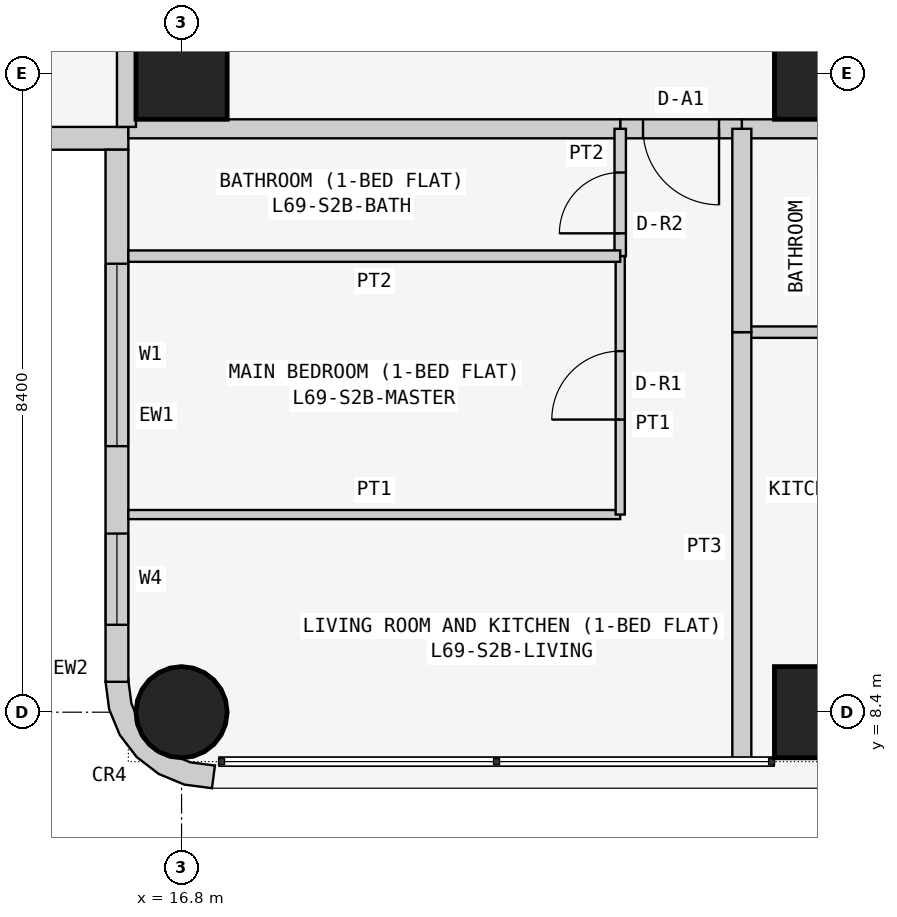
"""IFC4 building model, lengths in metres.
Left out: names, types, materials, properties, quantities, classifications, styles, units other than length and angle.
Written with IfcOpenShell. Run it as: python <this file> out.ifc"""

import sys

from ifc_helpers import new_model, si_unit, direction, frame, frame_2d, origin, origin_2d, place, context, subcontext, project, spatial, polyline, rectangle, circle, outline, extrude, element, fill, save


model = new_model("IFC4")
c1 = context("Model", 3, precision=1e-05, world=origin(), true_north=direction((0.0, 1.0)))
c2 = subcontext(c1, "Body", "Model", "MODEL_VIEW")
j1 = project(units=[si_unit("LENGTHUNIT", "METRE"), si_unit("PLANEANGLEUNIT", "RADIAN")], contexts=[c1])
p1 = place(None, origin())
s1 = spatial("IfcSite", under=j1, at=p1, CompositionType="ELEMENT")
p2 = place(p1, origin())
s2 = spatial("IfcBuilding", under=s1, at=p2, CompositionType="ELEMENT")
p3 = place(p2, frame((0.0, 0.0, 264.9)))
s3 = spatial("IfcBuildingStorey", under=s2, at=p3, CompositionType="ELEMENT", Elevation=264.9)
p4 = place(p3, frame((16.8, 8.4, 0.0), z_axis=(0.0, 0.0, 1.0), x_axis=(1.0, 0.0, 0.0)))
e1 = element("IfcColumn", 1, at=p4, inside=s3, PredefinedType="COLUMN", context=c2, shape_type="SweptSolid", body=[
    extrude(circle(Radius=0.6, at=origin_2d()), origin(), (0.0, 0.0, 1.0), 3.6),
])
for number, where, z_axis, x_axis in (
    (2, (16.8, 16.8, 0.0), (0.0, 0.0, 1.0), (1.0, 0.0, 0.0)),
    (3, (25.2, 8.4, 0.0), (0.0, 0.0, 1.0), (1.0, 0.0, 0.0)),
    (4, (25.2, 16.8, 0.0), (0.0, 0.0, 1.0), (1.0, 0.0, 0.0)),
):
    element("IfcColumn", number, at=place(p3, frame(where, z_axis=z_axis, x_axis=x_axis)), inside=s3, PredefinedType="COLUMN", context=c2, shape_type="SweptSolid", body=[
        extrude(rectangle(XDim=1.2, YDim=1.2, at=origin_2d()), origin(), (0.0, 0.0, 1.0), 3.6),
    ])
p5 = place(p3, frame((8.8, 15.95, 0.0), z_axis=(0.0, 0.0, 1.0), x_axis=(1.0, 0.0, 0.0)))
e5 = element("IfcWall", 5, at=p5, inside=s3, PredefinedType="SOLIDWALL", context=c2, shape_type="SweptSolid", body=[
    extrude(rectangle(XDim=7.3, YDim=0.3, at=frame_2d((3.65, 0.0))), origin(), (0.0, 0.0, 1.0), 3.45),
])
p6 = place(p5, frame((3.1, 0.0, 0.9)))
e6 = element("IfcOpeningElement", 6, at=p6, cuts=e5, PredefinedType="OPENING", context=c2, shape_type="SweptSolid", body=[
    extrude(rectangle(XDim=2.4, YDim=1.5, at=frame_2d((1.2, 0.75))), frame((0.0, 0.16, 0.0), z_axis=(0.0, -1.0, 0.0), x_axis=(1.0, 0.0, 0.0)), (0.0, 0.0, 1.0), 0.32),
])
p7 = place(p5, frame((0.75, 0.0, 0.9)))
e7 = element("IfcOpeningElement", 7, at=p7, cuts=e5, PredefinedType="OPENING", context=c2, shape_type="SweptSolid", body=[
    extrude(rectangle(XDim=1.2, YDim=1.5, at=frame_2d((0.6, 0.75))), frame((0.0, 0.16, 0.0), z_axis=(0.0, -1.0, 0.0), x_axis=(1.0, 0.0, 0.0)), (0.0, 0.0, 1.0), 0.32),
])
p8 = place(p3, frame((15.95, 15.8, 0.0), z_axis=(0.0, 0.0, 1.0), x_axis=(0.0, -1.0, 0.0)))
e8 = element("IfcWall", 8, at=p8, inside=s3, PredefinedType="SOLIDWALL", context=c2, shape_type="SweptSolid", body=[
    extrude(rectangle(XDim=7.0, YDim=0.3, at=frame_2d((3.5, 0.0))), origin(), (0.0, 0.0, 1.0), 3.45),
])
p9 = place(p8, frame((1.5, 0.0, 0.9)))
e9 = element("IfcOpeningElement", 9, at=p9, cuts=e8, PredefinedType="OPENING", context=c2, shape_type="SweptSolid", body=[
    extrude(rectangle(XDim=2.4, YDim=1.5, at=frame_2d((1.2, 0.75))), frame((0.0, 0.16, 0.0), z_axis=(0.0, -1.0, 0.0), x_axis=(1.0, 0.0, 0.0)), (0.0, 0.0, 1.0), 0.32),
])
p10 = place(p8, frame((5.05, 0.0, 0.9)))
e10 = element("IfcOpeningElement", 10, at=p10, cuts=e8, PredefinedType="OPENING", context=c2, shape_type="SweptSolid", body=[
    extrude(rectangle(XDim=1.2, YDim=1.5, at=frame_2d((0.6, 0.75))), frame((0.0, 0.16, 0.0), z_axis=(0.0, -1.0, 0.0), x_axis=(1.0, 0.0, 0.0)), (0.0, 0.0, 1.0), 0.32),
])
p11 = place(p3, frame((16.224, 8.762, 0.0), z_axis=(0.0, 0.0, 1.0), x_axis=(-0.707106781187, -0.707106781187, 0.0)))
e11 = element("IfcWall", 11, at=p11, inside=s3, PredefinedType="SOLIDWALL", context=c2, shape_type="SweptSolid", body=[
    extrude(outline(polyline([(0.033, 1.469), (0.047, 1.455), (0.233, 1.212), (0.292, 1.069), (0.358, 1.003), (0.449, 0.783), (0.449, 0.543), (0.358, 0.322), (0.292, 0.257), (0.233, 0.114), (0.047, -0.129), (0.033, -0.143), (0.273, -0.327), (0.495, -0.037), (0.635, 0.3), (0.683, 0.663), (0.635, 1.025), (0.495, 1.363), (0.273, 1.653), (0.033, 1.469)])), origin(), (0.0, 0.0, 1.0), 3.45),
])
p12 = place(p3, frame((26.8, 16.075, 0.0), z_axis=(0.0, 0.0, 1.0), x_axis=(-1.0, 0.0, 0.0)))
e12 = element("IfcWall", 12, at=p12, inside=s3, PredefinedType="PARTITIONING", context=c2, shape_type="SweptSolid", body=[
    extrude(rectangle(XDim=2.629, YDim=0.25, at=frame_2d((1.314, 0.0))), origin(), (0.0, 0.0, 1.0), 3.45),
])
p13 = place(p3, frame((24.171, 16.075, 0.0), z_axis=(0.0, 0.0, 1.0), x_axis=(-1.0, 0.0, 0.0)))
e13 = element("IfcWall", 13, at=p13, inside=s3, PredefinedType="PARTITIONING", context=c2, shape_type="SweptSolid", body=[
    extrude(rectangle(XDim=1.6, YDim=0.25, at=frame_2d((0.8, 0.0))), origin(), (0.0, 0.0, 1.0), 3.45),
])
p14 = place(p13, frame((0.3, 0.0, 0.0)))
e14 = element("IfcOpeningElement", 14, at=p14, cuts=e13, PredefinedType="OPENING", context=c2, shape_type="SweptSolid", body=[
    extrude(rectangle(XDim=1.0, YDim=2.1, at=frame_2d((0.5, 1.05))), frame((0.0, 0.135, 0.0), z_axis=(0.0, -1.0, 0.0), x_axis=(1.0, 0.0, 0.0)), (0.0, 0.0, 1.0), 0.27),
])
p15 = place(p3, frame((22.571, 16.075, 0.0), z_axis=(0.0, 0.0, 1.0), x_axis=(-1.0, 0.0, 0.0)))
e15 = element("IfcWall", 15, at=p15, inside=s3, PredefinedType="PARTITIONING", context=c2, shape_type="SweptSolid", body=[
    extrude(rectangle(XDim=6.471, YDim=0.25, at=frame_2d((3.235, 0.0))), origin(), (0.0, 0.0, 1.0), 3.45),
])
p16 = place(p3, frame((16.075, 16.1, 0.0), z_axis=(0.0, 0.0, 1.0), x_axis=(0.0, 1.0, 0.0)))
e16 = element("IfcWall", 16, at=p16, inside=s3, PredefinedType="PARTITIONING", context=c2, shape_type="SweptSolid", body=[
    extrude(rectangle(XDim=6.871, YDim=0.25, at=frame_2d((3.436, 0.0))), origin(), (0.0, 0.0, 1.0), 3.45),
])
p17 = place(p3, frame((24.171, 13.4, 0.0), z_axis=(0.0, 0.0, 1.0), x_axis=(1.0, 0.0, 0.0)))
e17 = element("IfcWall", 17, at=p17, inside=s3, PredefinedType="PARTITIONING", context=c2, shape_type="SweptSolid", body=[
    extrude(rectangle(XDim=2.629, YDim=0.15, at=frame_2d((1.314, 0.0))), origin(), (0.0, 0.0, 1.0), 3.45),
])
p18 = place(p3, frame((24.171, 7.75, 0.0), z_axis=(0.0, 0.0, 1.0), x_axis=(0.0, 1.0, 0.0)))
e18 = element("IfcWall", 18, at=p18, inside=s3, PredefinedType="PARTITIONING", context=c2, shape_type="SweptSolid", body=[
    extrude(rectangle(XDim=5.65, YDim=0.25, at=frame_2d((2.825, 0.0))), origin(), (0.0, 0.0, 1.0), 3.45),
])
p19 = place(p3, frame((24.171, 13.4, 0.0), z_axis=(0.0, 0.0, 1.0), x_axis=(0.0, 1.0, 0.0)))
e19 = element("IfcWall", 19, at=p19, inside=s3, PredefinedType="PARTITIONING", context=c2, shape_type="SweptSolid", body=[
    extrude(rectangle(XDim=2.675, YDim=0.25, at=frame_2d((1.337, 0.0))), origin(), (0.0, 0.0, 1.0), 3.45),
])
p20 = place(p3, frame((22.571, 14.4, 0.0), z_axis=(0.0, 0.0, 1.0), x_axis=(0.0, 1.0, 0.0)))
e20 = element("IfcWall", 20, at=p20, inside=s3, PredefinedType="PARTITIONING", context=c2, shape_type="SweptSolid", body=[
    extrude(rectangle(XDim=1.675, YDim=0.15, at=frame_2d((0.837, 0.0))), origin(), (0.0, 0.0, 1.0), 3.45),
])
p21 = place(p20, frame((0.3, 0.0, 0.0)))
e21 = element("IfcOpeningElement", 21, at=p21, cuts=e20, PredefinedType="OPENING", context=c2, shape_type="SweptSolid", body=[
    extrude(rectangle(XDim=0.8, YDim=2.1, at=frame_2d((0.4, 1.05))), frame((0.0, 0.085, 0.0), z_axis=(0.0, -1.0, 0.0), x_axis=(1.0, 0.0, 0.0)), (0.0, 0.0, 1.0), 0.17),
])
p22 = place(p3, frame((16.1, 11.0, 0.0), z_axis=(0.0, 0.0, 1.0), x_axis=(1.0, 0.0, 0.0)))
e22 = element("IfcWall", 22, at=p22, inside=s3, PredefinedType="PARTITIONING", context=c2, shape_type="SweptSolid", body=[
    extrude(rectangle(XDim=6.471, YDim=0.12, at=frame_2d((3.235, 0.0))), origin(), (0.0, 0.0, 1.0), 3.45),
])
p23 = place(p3, frame((22.571, 11.0, 0.0), z_axis=(0.0, 0.0, 1.0), x_axis=(0.0, 1.0, 0.0)))
e23 = element("IfcWall", 23, at=p23, inside=s3, PredefinedType="PARTITIONING", context=c2, shape_type="SweptSolid", body=[
    extrude(rectangle(XDim=3.4, YDim=0.12, at=frame_2d((1.7, 0.0))), origin(), (0.0, 0.0, 1.0), 3.45),
])
p24 = place(p23, frame((1.25, 0.0, 0.0)))
e24 = element("IfcOpeningElement", 24, at=p24, cuts=e23, PredefinedType="OPENING", context=c2, shape_type="SweptSolid", body=[
    extrude(rectangle(XDim=0.9, YDim=2.1, at=frame_2d((0.45, 1.05))), frame((0.0, 0.07, 0.0), z_axis=(0.0, -1.0, 0.0), x_axis=(1.0, 0.0, 0.0)), (0.0, 0.0, 1.0), 0.14),
])
p25 = place(p3, frame((22.571, 14.4, 0.0), z_axis=(0.0, 0.0, 1.0), x_axis=(-1.0, 0.0, 0.0)))
e25 = element("IfcWall", 25, at=p25, inside=s3, PredefinedType="PARTITIONING", context=c2, shape_type="SweptSolid", body=[
    extrude(rectangle(XDim=6.471, YDim=0.15, at=frame_2d((3.235, 0.0))), origin(), (0.0, 0.0, 1.0), 3.45),
])
p26 = place(p9, origin())
e26 = element("IfcWindow", 26, at=p26, inside=s3, PartitioningType="SINGLE_PANEL", PredefinedType="WINDOW", context=c2, shape_type="SweptSolid", body=[
    extrude(rectangle(XDim=2.4, YDim=1.5, at=frame_2d((1.2, 0.75))), frame((0.0, 0.03, 0.0), z_axis=(0.0, -1.0, 0.0), x_axis=(1.0, 0.0, 0.0)), (0.0, 0.0, 1.0), 0.06),
])
fill(e9, e26)
p27 = place(p10, origin())
e27 = element("IfcWindow", 27, at=p27, inside=s3, PartitioningType="SINGLE_PANEL", PredefinedType="WINDOW", context=c2, shape_type="SweptSolid", body=[
    extrude(rectangle(XDim=1.2, YDim=1.5, at=frame_2d((0.6, 0.75))), frame((0.0, 0.03, 0.0), z_axis=(0.0, -1.0, 0.0), x_axis=(1.0, 0.0, 0.0)), (0.0, 0.0, 1.0), 0.06),
])
fill(e10, e27)
p28 = place(p14, origin())
e28 = element("IfcDoor", 28, at=p28, inside=s3, OperationType="SINGLE_SWING_LEFT", PredefinedType="DOOR", context=c2, shape_type="SweptSolid", body=[
    extrude(rectangle(XDim=1.0, YDim=2.1, at=frame_2d((0.5, 1.05))), frame((0.0, 0.025, 0.0), z_axis=(0.0, -1.0, 0.0), x_axis=(1.0, 0.0, 0.0)), (0.0, 0.0, 1.0), 0.05),
])
fill(e14, e28)
p29 = place(p21, origin())
e29 = element("IfcDoor", 29, at=p29, inside=s3, OperationType="SINGLE_SWING_LEFT", PredefinedType="DOOR", context=c2, shape_type="SweptSolid", body=[
    extrude(rectangle(XDim=0.8, YDim=2.1, at=frame_2d((0.4, 1.05))), frame((0.0, 0.025, 0.0), z_axis=(0.0, -1.0, 0.0), x_axis=(1.0, 0.0, 0.0)), (0.0, 0.0, 1.0), 0.05),
])
fill(e21, e29)
p30 = place(p24, origin())
e30 = element("IfcDoor", 30, at=p30, inside=s3, OperationType="SINGLE_SWING_LEFT", PredefinedType="DOOR", context=c2, shape_type="SweptSolid", body=[
    extrude(rectangle(XDim=0.9, YDim=2.1, at=frame_2d((0.45, 1.05))), frame((0.0, 0.025, 0.0), z_axis=(0.0, -1.0, 0.0), x_axis=(1.0, 0.0, 0.0)), (0.0, 0.0, 1.0), 0.05),
])
fill(e24, e30)
save(model, sys.argv[1])
